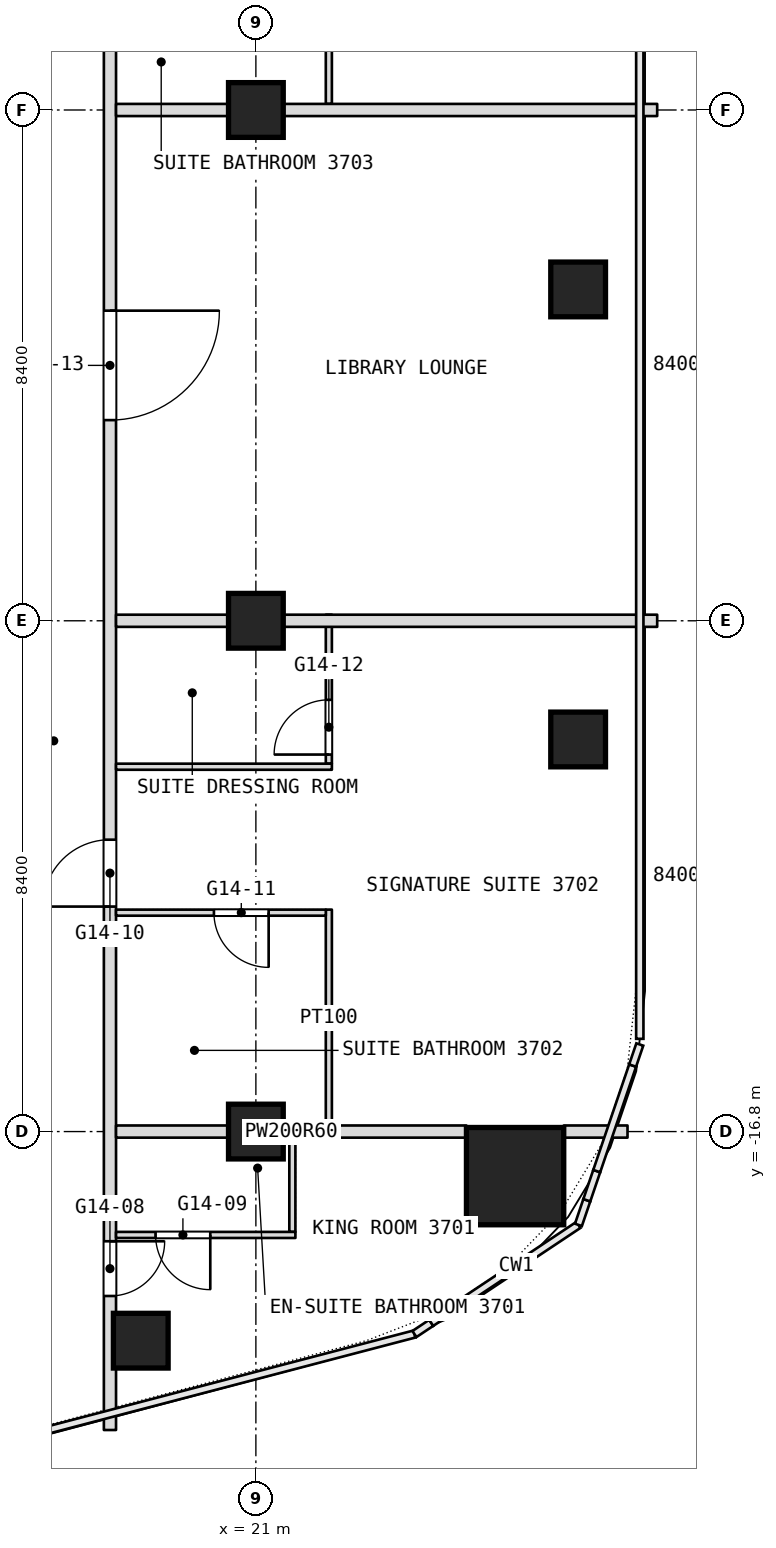
"""IFC4 building model, lengths in metres.
Left out: names, types, materials, properties, quantities, classifications, styles, units other than length and angle.
Written with IfcOpenShell. Run it as: python <this file> out.ifc"""

import sys

from ifc_helpers import new_model, si_unit, direction, frame, frame_2d, origin, origin_2d, place, context, subcontext, project, spatial, rectangle, extrude, element, fill, save


model = new_model("IFC4")
c1 = context("Model", 3, precision=1e-05, world=origin(), true_north=direction((0.0, 1.0)))
c2 = subcontext(c1, "Body", "Model", "MODEL_VIEW")
j1 = project(units=[si_unit("LENGTHUNIT", "METRE"), si_unit("PLANEANGLEUNIT", "RADIAN")], contexts=[c1])
p1 = place(None, origin())
s1 = spatial("IfcSite", under=j1, at=p1, CompositionType="ELEMENT")
p2 = place(p1, origin())
s2 = spatial("IfcBuilding", under=s1, at=p2, CompositionType="ELEMENT")
p3 = place(p2, frame((0.0, 0.0, 158.9)))
s3 = spatial("IfcBuildingStorey", under=s2, at=p3, CompositionType="ELEMENT", Elevation=158.9)
p4 = place(p3, frame((25.263, -17.533, 0.0), z_axis=(0.0, 0.0, 1.0), x_axis=(1.0, 0.0, 0.0)))
e1 = element("IfcColumn", 1, at=p4, inside=s3, PredefinedType="COLUMN", context=c2, shape_type="SweptSolid", body=[
    extrude(rectangle(XDim=1.6, YDim=1.6, at=origin_2d()), origin(), (0.0, 0.0, 1.0), 3.6),
])
for number, where, z_axis, x_axis in (
    (2, (21.0, -16.8, 0.0), (0.0, 0.0, 1.0), (1.0, 0.0, 0.0)),
    (3, (21.0, -8.4, 0.0), (0.0, 0.0, 1.0), (1.0, 0.0, 0.0)),
    (4, (21.0, 0.0, 0.0), (0.0, 0.0, 1.0), (1.0, 0.0, 0.0)),
    (5, (26.3, -2.951, 0.0), (0.0, 0.0, 1.0), (1.0, 0.0, 0.0)),
    (6, (26.3, -10.352, 0.0), (0.0, 0.0, 1.0), (1.0, 0.0, 0.0)),
    (7, (19.107, -20.239, 0.0), (0.0, 0.0, 1.0), (1.0, 0.0, 0.0)),
):
    element("IfcColumn", number, at=place(p3, frame(where, z_axis=z_axis, x_axis=x_axis)), inside=s3, PredefinedType="COLUMN", context=c2, shape_type="SweptSolid", body=[
        extrude(rectangle(XDim=0.9, YDim=0.9, at=origin_2d()), origin(), (0.0, 0.0, 1.0), 3.6),
    ])
p5 = place(p3, frame((22.2, -16.7, 0.0), z_axis=(0.0, 0.0, 1.0), x_axis=(0.0, 1.0, 0.0)))
e8 = element("IfcWall", 8, at=p5, inside=s3, PredefinedType="PARTITIONING", context=c2, shape_type="SweptSolid", body=[
    extrude(rectangle(XDim=3.55, YDim=0.1, at=frame_2d((1.775, 0.0))), origin(), (0.0, 0.0, 1.0), 3.34),
])
p6 = place(p3, frame((22.2, -10.75, 0.0), z_axis=(0.0, 0.0, 1.0), x_axis=(0.0, 1.0, 0.0)))
e9 = element("IfcWall", 9, at=p6, inside=s3, PredefinedType="PARTITIONING", context=c2, shape_type="SweptSolid", body=[
    extrude(rectangle(XDim=2.45, YDim=0.1, at=frame_2d((1.225, 0.0))), origin(), (0.0, 0.0, 1.0), 3.34),
])
p7 = place(p6, frame((0.15, 0.0, 0.0)))
e10 = element("IfcOpeningElement", 10, at=p7, cuts=e9, PredefinedType="OPENING", context=c2, shape_type="SweptSolid", body=[
    extrude(rectangle(XDim=0.9, YDim=2.1, at=frame_2d((0.45, 1.05))), frame((0.0, 0.05, 0.0), z_axis=(0.0, -1.0, 0.0), x_axis=(1.0, 0.0, 0.0)), (0.0, 0.0, 1.0), 0.1),
])
p8 = place(p3, frame((22.2, 0.1, 0.0), z_axis=(0.0, 0.0, 1.0), x_axis=(0.0, 1.0, 0.0)))
e11 = element("IfcWall", 11, at=p8, inside=s3, PredefinedType="PARTITIONING", context=c2, shape_type="SweptSolid", body=[
    extrude(rectangle(XDim=2.35, YDim=0.1, at=frame_2d((1.175, 0.0))), origin(), (0.0, 0.0, 1.0), 3.34),
])
p9 = place(p3, frame((21.6, -18.45, 0.0), z_axis=(0.0, 0.0, 1.0), x_axis=(0.0, 1.0, 0.0)))
e12 = element("IfcWall", 12, at=p9, inside=s3, PredefinedType="PARTITIONING", context=c2, shape_type="SweptSolid", body=[
    extrude(rectangle(XDim=1.75, YDim=0.1, at=frame_2d((0.875, 0.0))), origin(), (0.0, 0.0, 1.0), 3.34),
])
p10 = place(p3, frame((18.6, -21.708, 0.0), z_axis=(0.0, 0.0, 1.0), x_axis=(0.0, 1.0, 0.0)))
e13 = element("IfcWall", 13, at=p10, inside=s3, PredefinedType="PARTITIONING", context=c2, shape_type="SweptSolid", body=[
    extrude(rectangle(XDim=49.648, YDim=0.2, at=frame_2d((24.824, 0.0))), origin(), (0.0, 0.0, 1.0), 3.34),
])
p11 = place(p10, frame((2.204, 0.0, 0.0)))
e14 = element("IfcOpeningElement", 14, at=p11, cuts=e13, PredefinedType="OPENING", context=c2, shape_type="SweptSolid", body=[
    extrude(rectangle(XDim=0.9, YDim=2.1, at=frame_2d((0.45, 1.05))), frame((0.0, 0.1, 0.0), z_axis=(0.0, -1.0, 0.0), x_axis=(1.0, 0.0, 0.0)), (0.0, 0.0, 1.0), 0.2),
])
p12 = place(p10, frame((8.608, 0.0, 0.0)))
e15 = element("IfcOpeningElement", 15, at=p12, cuts=e13, PredefinedType="OPENING", context=c2, shape_type="SweptSolid", body=[
    extrude(rectangle(XDim=1.1, YDim=2.1, at=frame_2d((0.55, 1.05))), frame((0.0, 0.1, 0.0), z_axis=(0.0, -1.0, 0.0), x_axis=(1.0, 0.0, 0.0)), (0.0, 0.0, 1.0), 0.2),
])
p13 = place(p10, frame((16.608, 0.0, 0.0)))
e16 = element("IfcOpeningElement", 16, at=p13, cuts=e13, PredefinedType="OPENING", context=c2, shape_type="SweptSolid", body=[
    extrude(rectangle(XDim=1.8, YDim=2.1, at=frame_2d((0.9, 1.05))), frame((0.0, 0.1, 0.0), z_axis=(0.0, -1.0, 0.0), x_axis=(1.0, 0.0, 0.0)), (0.0, 0.0, 1.0), 0.2),
])
p14 = place(p10, frame((27.458, 0.0, 0.0)))
e17 = element("IfcOpeningElement", 17, at=p14, cuts=e13, PredefinedType="OPENING", context=c2, shape_type="SweptSolid", body=[
    extrude(rectangle(XDim=1.1, YDim=2.1, at=frame_2d((0.55, 1.05))), frame((0.0, 0.1, 0.0), z_axis=(0.0, -1.0, 0.0), x_axis=(1.0, 0.0, 0.0)), (0.0, 0.0, 1.0), 0.2),
])
p15 = place(p10, frame((30.508, 0.0, 0.0)))
e18 = element("IfcOpeningElement", 18, at=p15, cuts=e13, PredefinedType="OPENING", context=c2, shape_type="SweptSolid", body=[
    extrude(rectangle(XDim=1.0, YDim=2.1, at=frame_2d((0.5, 1.05))), frame((0.0, 0.1, 0.0), z_axis=(0.0, -1.0, 0.0), x_axis=(1.0, 0.0, 0.0)), (0.0, 0.0, 1.0), 0.2),
])
p16 = place(p10, frame((37.108, 0.0, 0.0)))
e19 = element("IfcOpeningElement", 19, at=p16, cuts=e13, PredefinedType="OPENING", context=c2, shape_type="SweptSolid", body=[
    extrude(rectangle(XDim=1.0, YDim=2.1, at=frame_2d((0.5, 1.05))), frame((0.0, 0.1, 0.0), z_axis=(0.0, -1.0, 0.0), x_axis=(1.0, 0.0, 0.0)), (0.0, 0.0, 1.0), 0.2),
])
p17 = place(p10, frame((42.608, 0.0, 0.0)))
e20 = element("IfcOpeningElement", 20, at=p17, cuts=e13, PredefinedType="OPENING", context=c2, shape_type="SweptSolid", body=[
    extrude(rectangle(XDim=1.0, YDim=2.1, at=frame_2d((0.5, 1.05))), frame((0.0, 0.1, 0.0), z_axis=(0.0, -1.0, 0.0), x_axis=(1.0, 0.0, 0.0)), (0.0, 0.0, 1.0), 0.2),
])
p18 = place(p10, frame((44.608, 0.0, 0.0)))
e21 = element("IfcOpeningElement", 21, at=p18, cuts=e13, PredefinedType="OPENING", context=c2, shape_type="SweptSolid", body=[
    extrude(rectangle(XDim=1.0, YDim=2.1, at=frame_2d((0.5, 1.05))), frame((0.0, 0.1, 0.0), z_axis=(0.0, -1.0, 0.0), x_axis=(1.0, 0.0, 0.0)), (0.0, 0.0, 1.0), 0.2),
])
p19 = place(p3, frame((18.7, -18.5, 0.0), z_axis=(0.0, 0.0, 1.0), x_axis=(1.0, 0.0, 0.0)))
e22 = element("IfcWall", 22, at=p19, inside=s3, PredefinedType="PARTITIONING", context=c2, shape_type="SweptSolid", body=[
    extrude(rectangle(XDim=2.95, YDim=0.1, at=frame_2d((1.475, 0.0))), origin(), (0.0, 0.0, 1.0), 3.34),
])
p20 = place(p19, frame((0.65, 0.0, 0.0)))
e23 = element("IfcOpeningElement", 23, at=p20, cuts=e22, PredefinedType="OPENING", context=c2, shape_type="SweptSolid", body=[
    extrude(rectangle(XDim=0.9, YDim=2.1, at=frame_2d((0.45, 1.05))), frame((0.0, 0.05, 0.0), z_axis=(0.0, -1.0, 0.0), x_axis=(1.0, 0.0, 0.0)), (0.0, 0.0, 1.0), 0.1),
])
p21 = place(p3, frame((18.7, -16.8, 0.0), z_axis=(0.0, 0.0, 1.0), x_axis=(1.0, 0.0, 0.0)))
e24 = element("IfcWall", 24, at=p21, inside=s3, PredefinedType="PARTITIONING", context=c2, shape_type="SweptSolid", body=[
    extrude(rectangle(XDim=5.763, YDim=0.2, at=frame_2d((2.881, 0.0))), origin(), (0.0, 0.0, 1.0), 2.89),
])
p22 = place(p3, frame((26.063, -16.8, 0.0), z_axis=(0.0, 0.0, 1.0), x_axis=(1.0, 0.0, 0.0)))
e25 = element("IfcWall", 25, at=p22, inside=s3, PredefinedType="PARTITIONING", context=c2, shape_type="SweptSolid", body=[
    extrude(rectangle(XDim=1.049, YDim=0.2, at=frame_2d((0.524, 0.0))), origin(), (0.0, 0.0, 1.0), 3.34),
])
p23 = place(p3, frame((18.7, -13.2, 0.0), z_axis=(0.0, 0.0, 1.0), x_axis=(1.0, 0.0, 0.0)))
e26 = element("IfcWall", 26, at=p23, inside=s3, PredefinedType="PARTITIONING", context=c2, shape_type="SweptSolid", body=[
    extrude(rectangle(XDim=3.45, YDim=0.1, at=frame_2d((1.725, 0.0))), origin(), (0.0, 0.0, 1.0), 3.34),
])
p24 = place(p23, frame((1.61, 0.0, 0.0)))
e27 = element("IfcOpeningElement", 27, at=p24, cuts=e26, PredefinedType="OPENING", context=c2, shape_type="SweptSolid", body=[
    extrude(rectangle(XDim=0.9, YDim=2.1, at=frame_2d((0.45, 1.05))), frame((0.0, 0.05, 0.0), z_axis=(0.0, -1.0, 0.0), x_axis=(1.0, 0.0, 0.0)), (0.0, 0.0, 1.0), 0.1),
])
p25 = place(p3, frame((18.7, -10.8, 0.0), z_axis=(0.0, 0.0, 1.0), x_axis=(1.0, 0.0, 0.0)))
e28 = element("IfcWall", 28, at=p25, inside=s3, PredefinedType="PARTITIONING", context=c2, shape_type="SweptSolid", body=[
    extrude(rectangle(XDim=3.55, YDim=0.1, at=frame_2d((1.775, 0.0))), origin(), (0.0, 0.0, 1.0), 3.34),
])
for number, where, z_axis, x_axis in (
    (29, (18.7, -8.4, 0.0), (0.0, 0.0, 1.0), (1.0, 0.0, 0.0)),
    (30, (18.7, 0.0, 0.0), (0.0, 0.0, 1.0), (1.0, 0.0, 0.0)),
):
    element("IfcWall", number, at=place(p3, frame(where, z_axis=z_axis, x_axis=x_axis)), inside=s3, PredefinedType="PARTITIONING", context=c2, shape_type="SweptSolid", body=[
        extrude(rectangle(XDim=8.9, YDim=0.2, at=frame_2d((4.45, 0.0))), origin(), (0.0, 0.0, 1.0), 2.89),
    ])
p26 = place(p7, origin())
e31 = element("IfcDoor", 31, at=p26, inside=s3, OperationType="SINGLE_SWING_LEFT", PredefinedType="DOOR", context=c2, shape_type="SweptSolid", body=[
    extrude(rectangle(XDim=0.9, YDim=2.1, at=frame_2d((0.45, 1.05))), frame((0.0, 0.025, 0.0), z_axis=(0.0, -1.0, 0.0), x_axis=(1.0, 0.0, 0.0)), (0.0, 0.0, 1.0), 0.05),
])
fill(e10, e31)
p27 = place(p11, origin())
e32 = element("IfcDoor", 32, at=p27, inside=s3, OperationType="SINGLE_SWING_LEFT", PredefinedType="DOOR", context=c2, shape_type="SweptSolid", body=[
    extrude(rectangle(XDim=0.9, YDim=2.1, at=frame_2d((0.45, 1.05))), frame((0.0, 0.025, 0.0), z_axis=(0.0, -1.0, 0.0), x_axis=(1.0, 0.0, 0.0)), (0.0, 0.0, 1.0), 0.05),
])
fill(e14, e32)
p28 = place(p12, origin())
e33 = element("IfcDoor", 33, at=p28, inside=s3, OperationType="SINGLE_SWING_RIGHT", PredefinedType="DOOR", context=c2, shape_type="SweptSolid", body=[
    extrude(rectangle(XDim=1.1, YDim=2.1, at=frame_2d((0.55, 1.05))), frame((0.0, 0.025, 0.0), z_axis=(0.0, -1.0, 0.0), x_axis=(1.0, 0.0, 0.0)), (0.0, 0.0, 1.0), 0.05),
])
fill(e15, e33)
p29 = place(p13, origin())
e34 = element("IfcDoor", 34, at=p29, inside=s3, OperationType="DOUBLE_DOOR_SINGLE_SWING", PredefinedType="DOOR", context=c2, shape_type="SweptSolid", body=[
    extrude(rectangle(XDim=1.8, YDim=2.1, at=frame_2d((0.9, 1.05))), frame((0.0, 0.025, 0.0), z_axis=(0.0, -1.0, 0.0), x_axis=(1.0, 0.0, 0.0)), (0.0, 0.0, 1.0), 0.05),
])
fill(e16, e34)
p30 = place(p20, origin())
e35 = element("IfcDoor", 35, at=p30, inside=s3, OperationType="SINGLE_SWING_LEFT", PredefinedType="DOOR", context=c2, shape_type="SweptSolid", body=[
    extrude(rectangle(XDim=0.9, YDim=2.1, at=frame_2d((0.45, 1.05))), frame((0.0, 0.025, 0.0), z_axis=(0.0, -1.0, 0.0), x_axis=(1.0, 0.0, 0.0)), (0.0, 0.0, 1.0), 0.05),
])
fill(e23, e35)
p31 = place(p24, origin())
e36 = element("IfcDoor", 36, at=p31, inside=s3, OperationType="SINGLE_SWING_LEFT", PredefinedType="DOOR", context=c2, shape_type="SweptSolid", body=[
    extrude(rectangle(XDim=0.9, YDim=2.1, at=frame_2d((0.45, 1.05))), frame((0.0, 0.025, 0.0), z_axis=(0.0, -1.0, 0.0), x_axis=(1.0, 0.0, 0.0)), (0.0, 0.0, 1.0), 0.05),
])
fill(e27, e36)
save(model, sys.argv[1])
